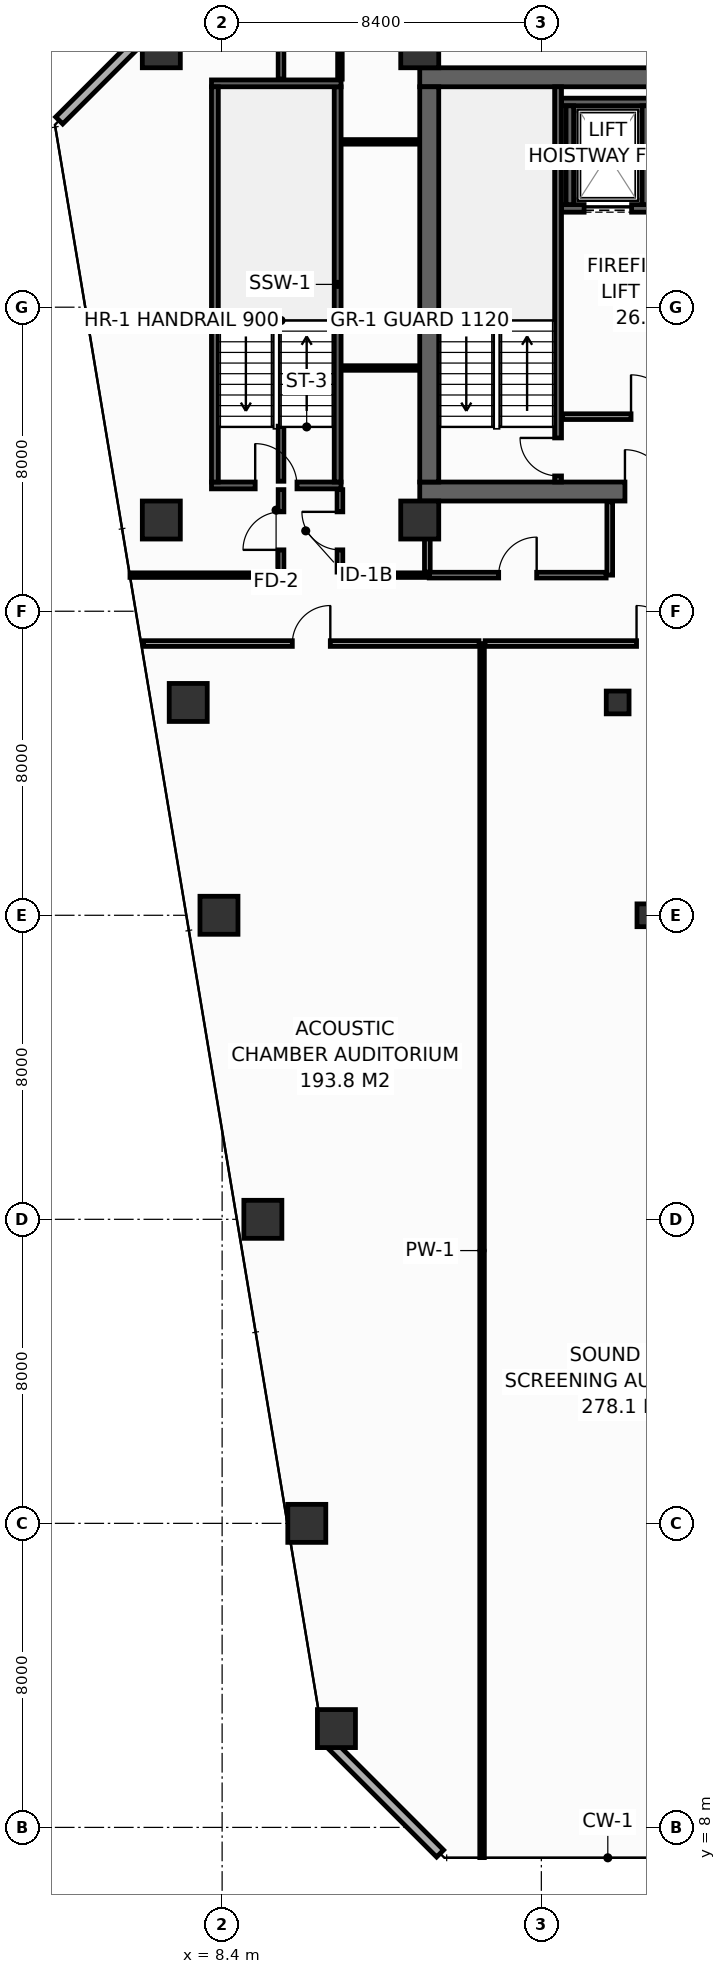
"""IFC4 building model, lengths in metres.
Left out: names, types, materials, properties, quantities, classifications, styles, units other than length and angle.
Written with IfcOpenShell. Run it as: python <this file> out.ifc"""

import sys

from ifc_helpers import new_model, si_unit, direction, frame, frame_2d, origin, origin_2d, place, context, subcontext, project, spatial, rectangle, hollow_rectangle, extrude, element, fill, save


model = new_model("IFC4")
c1 = context("Model", 3, precision=1e-05, world=origin(), true_north=direction((0.0, 1.0)))
c2 = subcontext(c1, "Body", "Model", "MODEL_VIEW")
j1 = project(units=[si_unit("LENGTHUNIT", "METRE"), si_unit("PLANEANGLEUNIT", "RADIAN")], contexts=[c1])
p1 = place(None, origin())
s1 = spatial("IfcSite", under=j1, at=p1, CompositionType="ELEMENT")
p2 = place(p1, origin())
s2 = spatial("IfcBuilding", under=s1, at=p2, CompositionType="ELEMENT")
p3 = place(p2, frame((0.0, 0.0, 144.8)))
s3 = spatial("IfcBuildingStorey", under=s2, at=p3, CompositionType="ELEMENT", Elevation=144.8)
p4 = place(p3, frame((13.6, 43.15, 0.0), z_axis=(0.0, 0.0, 1.0), x_axis=(1.0, 0.0, 0.0)))
e1 = element("IfcWall", 1, at=p4, inside=s3, PredefinedType="SHEAR", context=c2, shape_type="SweptSolid", body=[
    extrude(rectangle(XDim=32.7, YDim=0.5, at=frame_2d((16.35, 0.0))), origin(), (0.0, 0.0, 1.0), 3.55),
])
p5 = place(p4, frame((5.4, 0.0, 0.0)))
e2 = element("IfcOpeningElement", 2, at=p5, cuts=e1, PredefinedType="OPENING", context=c2, shape_type="SweptSolid", body=[
    extrude(rectangle(XDim=1.1, YDim=2.15, at=frame_2d((0.55, 1.075))), frame((0.0, 0.26, 0.0), z_axis=(0.0, -1.0, 0.0), x_axis=(1.0, 0.0, 0.0)), (0.0, 0.0, 1.0), 0.52),
])
p6 = place(p4, frame((25.6, 0.0, 0.0)))
e3 = element("IfcOpeningElement", 3, at=p6, cuts=e1, PredefinedType="OPENING", context=c2, shape_type="SweptSolid", body=[
    extrude(rectangle(XDim=1.1, YDim=2.15, at=frame_2d((0.55, 1.075))), frame((0.0, 0.26, 0.0), z_axis=(0.0, -1.0, 0.0), x_axis=(1.0, 0.0, 0.0)), (0.0, 0.0, 1.0), 0.52),
])
p7 = place(p3, frame((13.6, 54.05, 0.0), z_axis=(0.0, 0.0, 1.0), x_axis=(1.0, 0.0, 0.0)))
e4 = element("IfcWall", 4, at=p7, inside=s3, PredefinedType="SHEAR", context=c2, shape_type="SweptSolid", body=[
    extrude(rectangle(XDim=32.7, YDim=0.5, at=frame_2d((16.35, 0.0))), origin(), (0.0, 0.0, 1.0), 3.55),
])
p8 = place(p3, frame((13.85, 43.4, 0.0), z_axis=(0.0, 0.0, 1.0), x_axis=(0.0, 1.0, 0.0)))
e5 = element("IfcWall", 5, at=p8, inside=s3, PredefinedType="SHEAR", context=c2, shape_type="SweptSolid", body=[
    extrude(rectangle(XDim=10.4, YDim=0.5, at=frame_2d((5.2, 0.0))), origin(), (0.0, 0.0, 1.0), 3.55),
])
for number, where, z_axis, x_axis in (
    (6, (6.8, 54.8, 0.0), (0.0, 0.0, 1.0), (1.0, 0.0, 0.0)),
    (7, (13.6, 54.8, 0.0), (0.0, 0.0, 1.0), (1.0, 0.0, 0.0)),
    (8, (6.8, 42.4, 0.0), (0.0, 0.0, 1.0), (1.0, 0.0, 0.0)),
    (9, (13.6, 42.4, 0.0), (0.0, 0.0, 1.0), (1.0, 0.0, 0.0)),
    (10, (11.408, 10.6, 0.0), (0.0, 0.0, 1.0), (1.0, 0.0, 0.0)),
    (11, (10.628, 16.0, 0.0), (0.0, 0.0, 1.0), (1.0, 0.0, 0.0)),
    (12, (9.472, 24.0, 0.0), (0.0, 0.0, 1.0), (1.0, 0.0, 0.0)),
    (13, (8.317, 32.0, 0.0), (0.0, 0.0, 1.0), (1.0, 0.0, 0.0)),
):
    element("IfcColumn", number, at=place(p3, frame(where, z_axis=z_axis, x_axis=x_axis)), inside=s3, PredefinedType="COLUMN", context=c2, shape_type="SweptSolid", body=[
        extrude(hollow_rectangle(XDim=1.0, YDim=1.0, WallThickness=0.045, at=origin_2d()), origin(), (0.0, 0.0, 1.0), 3.8),
    ])
p9 = place(p3, frame((19.617, 32.0, 0.0), z_axis=(0.0, 0.0, 1.0), x_axis=(1.0, 0.0, 0.0)))
e14 = element("IfcColumn", 14, at=p9, inside=s3, PredefinedType="COLUMN", context=c2, shape_type="SweptSolid", body=[
    extrude(hollow_rectangle(XDim=0.6, YDim=0.6, WallThickness=0.028, at=origin_2d()), origin(), (0.0, 0.0, 1.0), 3.8),
])
p10 = place(p3, frame((7.508, 37.6, 0.0), z_axis=(0.0, 0.0, 1.0), x_axis=(1.0, 0.0, 0.0)))
e15 = element("IfcColumn", 15, at=p10, inside=s3, PredefinedType="COLUMN", context=c2, shape_type="SweptSolid", body=[
    extrude(hollow_rectangle(XDim=1.0, YDim=1.0, WallThickness=0.045, at=origin_2d()), origin(), (0.0, 0.0, 1.0), 3.8),
])
p11 = place(p3, frame((18.808, 37.6, 0.0), z_axis=(0.0, 0.0, 1.0), x_axis=(1.0, 0.0, 0.0)))
e16 = element("IfcColumn", 16, at=p11, inside=s3, PredefinedType="COLUMN", context=c2, shape_type="SweptSolid", body=[
    extrude(hollow_rectangle(XDim=0.6, YDim=0.6, WallThickness=0.028, at=origin_2d()), origin(), (0.0, 0.0, 1.0), 3.8),
])
p12 = place(p3, frame((17.33, 50.6, 0.0), z_axis=(0.0, 0.0, 1.0), x_axis=(1.0, 0.0, 0.0)))
e17 = element("IfcWall", 17, at=p12, inside=s3, PredefinedType="SHEAR", context=c2, shape_type="SweptSolid", body=[
    extrude(rectangle(XDim=2.52, YDim=0.2, at=frame_2d((1.26, 0.0))), origin(), (0.0, 0.0, 1.0), 3.55),
])
p13 = place(p12, frame((0.595, 0.0, 0.0)))
e18 = element("IfcOpeningElement", 18, at=p13, cuts=e17, PredefinedType="OPENING", context=c2, shape_type="SweptSolid", body=[
    extrude(rectangle(XDim=1.25, YDim=2.3, at=frame_2d((0.625, 1.15))), frame((0.0, 0.11, 0.0), z_axis=(0.0, -1.0, 0.0), x_axis=(1.0, 0.0, 0.0)), (0.0, 0.0, 1.0), 0.22),
])
p14 = place(p3, frame((17.33, 53.4, 0.0), z_axis=(0.0, 0.0, 1.0), x_axis=(1.0, 0.0, 0.0)))
e19 = element("IfcWall", 19, at=p14, inside=s3, PredefinedType="SHEAR", context=c2, shape_type="SweptSolid", body=[
    extrude(rectangle(XDim=2.52, YDim=0.2, at=frame_2d((1.26, 0.0))), origin(), (0.0, 0.0, 1.0), 3.55),
])
for number, where, z_axis, x_axis in (
    (20, (17.55, 50.7, 0.0), (0.0, 0.0, 1.0), (0.0, 1.0, 0.0)),
    (21, (19.55, 50.7, 0.0), (0.0, 0.0, 1.0), (0.0, 1.0, 0.0)),
):
    element("IfcWall", number, at=place(p3, frame(where, z_axis=z_axis, x_axis=x_axis)), inside=s3, PredefinedType="SHEAR", context=c2, shape_type="SweptSolid", body=[
        extrude(rectangle(XDim=2.6, YDim=0.2, at=frame_2d((1.3, 0.0))), origin(), (0.0, 0.0, 1.0), 3.55),
    ])
p15 = place(p3, frame((17.24, 43.4, 0.0), z_axis=(0.0, 0.0, 1.0), x_axis=(0.0, 1.0, 0.0)))
e22 = element("IfcWall", 22, at=p15, inside=s3, PredefinedType="SHEAR", context=c2, shape_type="SweptSolid", body=[
    extrude(rectangle(XDim=10.4, YDim=0.18, at=frame_2d((5.2, 0.0))), origin(), (0.0, 0.0, 1.0), 3.55),
])
p16 = place(p15, frame((0.16, 0.0, 0.0)))
e23 = element("IfcOpeningElement", 23, at=p16, cuts=e22, PredefinedType="OPENING", context=c2, shape_type="SweptSolid", body=[
    extrude(rectangle(XDim=1.0, YDim=2.15, at=frame_2d((0.5, 1.075))), frame((0.0, 0.1, 0.0), z_axis=(0.0, -1.0, 0.0), x_axis=(1.0, 0.0, 0.0)), (0.0, 0.0, 1.0), 0.2),
])
p17 = place(p3, frame((8.12, 43.31, 0.0), z_axis=(0.0, 0.0, 1.0), x_axis=(1.0, 0.0, 0.0)))
e24 = element("IfcWall", 24, at=p17, inside=s3, PredefinedType="SHEAR", context=c2, shape_type="SweptSolid", body=[
    extrude(rectangle(XDim=3.41, YDim=0.18, at=frame_2d((1.705, 0.0))), origin(), (0.0, 0.0, 1.0), 3.55),
])
p18 = place(p17, frame((1.15, 0.0, 0.0)))
e25 = element("IfcOpeningElement", 25, at=p18, cuts=e24, PredefinedType="OPENING", context=c2, shape_type="SweptSolid", body=[
    extrude(rectangle(XDim=1.1, YDim=2.15, at=frame_2d((0.55, 1.075))), frame((0.0, 0.1, 0.0), z_axis=(0.0, -1.0, 0.0), x_axis=(1.0, 0.0, 0.0)), (0.0, 0.0, 1.0), 0.2),
])
p19 = place(p3, frame((11.44, 43.4, 0.0), z_axis=(0.0, 0.0, 1.0), x_axis=(0.0, 1.0, 0.0)))
e26 = element("IfcWall", 26, at=p19, inside=s3, PredefinedType="SHEAR", context=c2, shape_type="SweptSolid", body=[
    extrude(rectangle(XDim=10.4, YDim=0.18, at=frame_2d((5.2, 0.0))), origin(), (0.0, 0.0, 1.0), 3.55),
])
p20 = place(p3, frame((11.53, 53.89, 0.0), z_axis=(0.0, 0.0, 1.0), x_axis=(-1.0, 0.0, 0.0)))
e27 = element("IfcWall", 27, at=p20, inside=s3, PredefinedType="SHEAR", context=c2, shape_type="SweptSolid", body=[
    extrude(rectangle(XDim=3.41, YDim=0.18, at=frame_2d((1.705, 0.0))), origin(), (0.0, 0.0, 1.0), 3.55),
])
p21 = place(p3, frame((8.21, 53.8, 0.0), z_axis=(0.0, 0.0, 1.0), x_axis=(0.0, -1.0, 0.0)))
e28 = element("IfcWall", 28, at=p21, inside=s3, PredefinedType="SHEAR", context=c2, shape_type="SweptSolid", body=[
    extrude(rectangle(XDim=10.4, YDim=0.18, at=frame_2d((5.2, 0.0))), origin(), (0.0, 0.0, 1.0), 3.55),
])
p22 = place(p3, frame((17.36, 45.12, 0.0), z_axis=(0.0, 0.0, 1.0), x_axis=(1.0, 0.0, 0.0)))
e29 = element("IfcWall", 29, at=p22, inside=s3, PredefinedType="PARTITIONING", context=c2, shape_type="SweptSolid", body=[
    extrude(rectangle(XDim=5.14, YDim=0.15, at=frame_2d((2.57, 0.0))), origin(), (0.0, 0.0, 1.0), 3.55),
])
p23 = place(p22, frame((1.8, 0.0, 0.0)))
e30 = element("IfcOpeningElement", 30, at=p23, cuts=e29, PredefinedType="OPENING", context=c2, shape_type="SweptSolid", body=[
    extrude(rectangle(XDim=1.1, YDim=2.15, at=frame_2d((0.55, 1.075))), frame((0.0, 0.085, 0.0), z_axis=(0.0, -1.0, 0.0), x_axis=(1.0, 0.0, 0.0)), (0.0, 0.0, 1.0), 0.17),
])
p24 = place(p3, frame((11.162, 10.287, 0.0), z_axis=(0.0, 0.0, 1.0), x_axis=(0.70707775441, -0.707135806771, 0.0)))
e31 = element("IfcWall", 31, at=p24, inside=s3, PredefinedType="STANDARD", context=c2, shape_type="SweptSolid", body=[
    extrude(rectangle(XDim=4.206, YDim=0.26, at=frame_2d((2.103, 0.0))), origin(), (0.0, 0.0, 1.0), 3.55),
])
p25 = place(p3, frame((7.087, 55.887, 0.0), z_axis=(0.0, 0.0, 1.0), x_axis=(-0.707106781187, -0.707106781187, 0.0)))
e32 = element("IfcWall", 32, at=p25, inside=s3, PredefinedType="STANDARD", context=c2, shape_type="SweptSolid", body=[
    extrude(rectangle(XDim=4.206, YDim=0.26, at=frame_2d((2.103, 0.0))), origin(), (0.0, 0.0, 1.0), 3.55),
])
p26 = place(p3, frame((5.975, 40.95, 0.0), z_axis=(0.0, 0.0, 1.0), x_axis=(1.0, 0.0, 0.0)))
e33 = element("IfcWall", 33, at=p26, inside=s3, PredefinedType="PARTITIONING", context=c2, shape_type="SweptSolid", body=[
    extrude(rectangle(XDim=3.975, YDim=0.12, at=frame_2d((1.987, 0.0))), origin(), (0.0, 0.0, 1.0), 3.035),
])
p27 = place(p3, frame((11.5, 40.95, 0.0), z_axis=(0.0, 0.0, 1.0), x_axis=(1.0, 0.0, 0.0)))
e34 = element("IfcWall", 34, at=p27, inside=s3, PredefinedType="PARTITIONING", context=c2, shape_type="SweptSolid", body=[
    extrude(rectangle(XDim=2.35, YDim=0.12, at=frame_2d((1.175, 0.0))), origin(), (0.0, 0.0, 1.0), 3.55),
])
p28 = place(p3, frame((11.55, 52.35, 0.0), z_axis=(0.0, 0.0, 1.0), x_axis=(1.0, 0.0, 0.0)))
e35 = element("IfcWall", 35, at=p28, inside=s3, PredefinedType="PARTITIONING", context=c2, shape_type="SweptSolid", body=[
    extrude(rectangle(XDim=2.03, YDim=0.12, at=frame_2d((1.015, 0.0))), origin(), (0.0, 0.0, 1.0), 3.55),
])
p29 = place(p3, frame((11.5, 54.0, 0.0), z_axis=(0.0, 0.0, 1.0), x_axis=(0.0, 1.0, 0.0)))
e36 = element("IfcWall", 36, at=p29, inside=s3, PredefinedType="PARTITIONING", context=c2, shape_type="SweptSolid", body=[
    extrude(rectangle(XDim=1.995, YDim=0.12, at=frame_2d((0.998, 0.0))), origin(), (0.0, 0.0, 1.0), 2.935),
])
p30 = place(p3, frame((4.87, 47.6, 0.0), z_axis=(0.0, 0.0, 1.0), x_axis=(1.0, 0.0, 0.0)))
e37 = element("IfcWall", 37, at=p30, inside=s3, PredefinedType="PARTITIONING", context=c2, shape_type="SweptSolid", body=[
    extrude(rectangle(XDim=3.23, YDim=0.12, at=frame_2d((1.615, 0.0))), origin(), (0.0, 0.0, 1.0), 2.835),
])
p31 = place(p3, frame((9.95, 41.03, 0.0), z_axis=(0.0, 0.0, 1.0), x_axis=(0.0, 1.0, 0.0)))
e38 = element("IfcWall", 38, at=p31, inside=s3, PredefinedType="PARTITIONING", context=c2, shape_type="SweptSolid", body=[
    extrude(rectangle(XDim=2.17, YDim=0.15, at=frame_2d((1.085, 0.0))), origin(), (0.0, 0.0, 1.0), 2.835),
])
p32 = place(p31, frame((0.585, 0.0, 0.0)))
e39 = element("IfcOpeningElement", 39, at=p32, cuts=e38, PredefinedType="OPENING", context=c2, shape_type="SweptSolid", body=[
    extrude(rectangle(XDim=1.0, YDim=2.15, at=frame_2d((0.5, 1.075))), frame((0.0, 0.085, 0.0), z_axis=(0.0, -1.0, 0.0), x_axis=(1.0, 0.0, 0.0)), (0.0, 0.0, 1.0), 0.17),
])
p33 = place(p3, frame((9.95, 43.42, 0.0), z_axis=(0.0, 0.0, 1.0), x_axis=(0.0, 1.0, 0.0)))
e40 = element("IfcWall", 40, at=p33, inside=s3, PredefinedType="PARTITIONING", context=c2, shape_type="SweptSolid", body=[
    extrude(rectangle(XDim=1.45, YDim=0.15, at=frame_2d((0.725, 0.0))), origin(), (0.0, 0.0, 1.0), 3.55),
])
p34 = place(p3, frame((9.95, 54.0, 0.0), z_axis=(0.0, 0.0, 1.0), x_axis=(0.0, 1.0, 0.0)))
e41 = element("IfcWall", 41, at=p34, inside=s3, PredefinedType="PARTITIONING", context=c2, shape_type="SweptSolid", body=[
    extrude(rectangle(XDim=1.995, YDim=0.15, at=frame_2d((0.998, 0.0))), origin(), (0.0, 0.0, 1.0), 2.935),
])
p35 = place(p3, frame((11.55, 46.4, 0.0), z_axis=(0.0, 0.0, 1.0), x_axis=(1.0, 0.0, 0.0)))
e42 = element("IfcWall", 42, at=p35, inside=s3, PredefinedType="PARTITIONING", context=c2, shape_type="SweptSolid", body=[
    extrude(rectangle(XDim=2.03, YDim=0.12, at=frame_2d((1.015, 0.0))), origin(), (0.0, 0.0, 1.0), 3.55),
])
p36 = place(p3, frame((11.5, 41.03, 0.0), z_axis=(0.0, 0.0, 1.0), x_axis=(0.0, 1.0, 0.0)))
e43 = element("IfcWall", 43, at=p36, inside=s3, PredefinedType="PARTITIONING", context=c2, shape_type="SweptSolid", body=[
    extrude(rectangle(XDim=2.17, YDim=0.15, at=frame_2d((1.085, 0.0))), origin(), (0.0, 0.0, 1.0), 2.835),
])
p37 = place(p36, frame((0.585, 0.0, 0.0)))
e44 = element("IfcOpeningElement", 44, at=p37, cuts=e43, PredefinedType="OPENING", context=c2, shape_type="SweptSolid", body=[
    extrude(rectangle(XDim=1.0, YDim=2.15, at=frame_2d((0.5, 1.075))), frame((0.0, 0.085, 0.0), z_axis=(0.0, -1.0, 0.0), x_axis=(1.0, 0.0, 0.0)), (0.0, 0.0, 1.0), 0.17),
])
p38 = place(p3, frame((13.8, 41.03, 0.0), z_axis=(0.0, 0.0, 1.0), x_axis=(0.0, 1.0, 0.0)))
e45 = element("IfcWall", 45, at=p38, inside=s3, PredefinedType="PARTITIONING", context=c2, shape_type="SweptSolid", body=[
    extrude(rectangle(XDim=1.85, YDim=0.15, at=frame_2d((0.925, 0.0))), origin(), (0.0, 0.0, 1.0), 3.55),
])
p39 = place(p3, frame((18.6, 40.95, 0.0), z_axis=(0.0, 0.0, 1.0), x_axis=(0.0, 1.0, 0.0)))
e46 = element("IfcWall", 46, at=p39, inside=s3, PredefinedType="PARTITIONING", context=c2, shape_type="SweptSolid", body=[
    extrude(rectangle(XDim=1.93, YDim=0.15, at=frame_2d((0.965, 0.0))), origin(), (0.0, 0.0, 1.0), 3.55),
])
p40 = place(p3, frame((13.85, 40.95, 0.0), z_axis=(0.0, 0.0, 1.0), x_axis=(1.0, 0.0, 0.0)))
e47 = element("IfcWall", 47, at=p40, inside=s3, PredefinedType="PARTITIONING", context=c2, shape_type="SweptSolid", body=[
    extrude(rectangle(XDim=4.655, YDim=0.15, at=frame_2d((2.327, 0.0))), origin(), (0.0, 0.0, 1.0), 3.55),
])
p41 = place(p40, frame((1.827, 0.0, 0.0)))
e48 = element("IfcOpeningElement", 48, at=p41, cuts=e47, PredefinedType="OPENING", context=c2, shape_type="SweptSolid", body=[
    extrude(rectangle(XDim=1.0, YDim=2.15, at=frame_2d((0.5, 1.075))), frame((0.0, 0.085, 0.0), z_axis=(0.0, -1.0, 0.0), x_axis=(1.0, 0.0, 0.0)), (0.0, 0.0, 1.0), 0.17),
])
p42 = place(p3, frame((15.24, 7.205, 0.0), z_axis=(0.0, 0.0, 1.0), x_axis=(0.0, 1.0, 0.0)))
e49 = element("IfcWall", 49, at=p42, inside=s3, PredefinedType="PARTITIONING", context=c2, shape_type="SweptSolid", body=[
    extrude(rectangle(XDim=31.945, YDim=0.12, at=frame_2d((15.972, 0.0))), origin(), (0.0, 0.0, 1.0), 2.835),
])
p43 = place(p3, frame((6.334, 39.15, 0.0), z_axis=(0.0, 0.0, 1.0), x_axis=(1.0, 0.0, 0.0)))
e50 = element("IfcWall", 50, at=p43, inside=s3, PredefinedType="PARTITIONING", context=c2, shape_type="SweptSolid", body=[
    extrude(rectangle(XDim=8.826, YDim=0.15, at=frame_2d((4.413, 0.0))), origin(), (0.0, 0.0, 1.0), 3.035),
])
p44 = place(p43, frame((3.913, 0.0, 0.0)))
e51 = element("IfcOpeningElement", 51, at=p44, cuts=e50, PredefinedType="OPENING", context=c2, shape_type="SweptSolid", body=[
    extrude(rectangle(XDim=1.0, YDim=2.15, at=frame_2d((0.5, 1.075))), frame((0.0, 0.085, 0.0), z_axis=(0.0, -1.0, 0.0), x_axis=(1.0, 0.0, 0.0)), (0.0, 0.0, 1.0), 0.17),
])
p45 = place(p3, frame((15.32, 39.15, 0.0), z_axis=(0.0, 0.0, 1.0), x_axis=(1.0, 0.0, 0.0)))
e52 = element("IfcWall", 52, at=p45, inside=s3, PredefinedType="PARTITIONING", context=c2, shape_type="SweptSolid", body=[
    extrude(rectangle(XDim=8.53, YDim=0.15, at=frame_2d((4.265, 0.0))), origin(), (0.0, 0.0, 1.0), 2.835),
])
p46 = place(p45, frame((3.985, 0.0, 0.0)))
e53 = element("IfcOpeningElement", 53, at=p46, cuts=e52, PredefinedType="OPENING", context=c2, shape_type="SweptSolid", body=[
    extrude(rectangle(XDim=1.0, YDim=2.15, at=frame_2d((0.5, 1.075))), frame((0.0, 0.085, 0.0), z_axis=(0.0, -1.0, 0.0), x_axis=(1.0, 0.0, 0.0)), (0.0, 0.0, 1.0), 0.17),
])
p47 = place(p13, origin())
e54 = element("IfcDoor", 54, at=p47, inside=s3, OperationType="SLIDING_TO_LEFT", PredefinedType="DOOR", context=c2, shape_type="SweptSolid", body=[
    extrude(rectangle(XDim=1.25, YDim=2.3, at=frame_2d((0.625, 1.15))), frame((0.0, 0.025, 0.0), z_axis=(0.0, -1.0, 0.0), x_axis=(1.0, 0.0, 0.0)), (0.0, 0.0, 1.0), 0.05),
])
fill(e18, e54)
p48 = place(p16, origin())
e55 = element("IfcDoor", 55, at=p48, inside=s3, OperationType="SINGLE_SWING_RIGHT", PredefinedType="DOOR", context=c2, shape_type="SweptSolid", body=[
    extrude(rectangle(XDim=1.0, YDim=2.15, at=frame_2d((0.5, 1.075))), frame((0.0, 0.025, 0.0), z_axis=(0.0, -1.0, 0.0), x_axis=(1.0, 0.0, 0.0)), (0.0, 0.0, 1.0), 0.05),
])
fill(e23, e55)
p49 = place(p18, origin())
e56 = element("IfcDoor", 56, at=p49, inside=s3, OperationType="SINGLE_SWING_LEFT", PredefinedType="DOOR", context=c2, shape_type="SweptSolid", body=[
    extrude(rectangle(XDim=1.1, YDim=2.15, at=frame_2d((0.55, 1.075))), frame((0.0, 0.025, 0.0), z_axis=(0.0, -1.0, 0.0), x_axis=(1.0, 0.0, 0.0)), (0.0, 0.0, 1.0), 0.05),
])
fill(e25, e56)
p50 = place(p23, origin())
e57 = element("IfcDoor", 57, at=p50, inside=s3, OperationType="SINGLE_SWING_LEFT", PredefinedType="DOOR", context=c2, shape_type="SweptSolid", body=[
    extrude(rectangle(XDim=1.1, YDim=2.15, at=frame_2d((0.55, 1.075))), frame((0.0, 0.025, 0.0), z_axis=(0.0, -1.0, 0.0), x_axis=(1.0, 0.0, 0.0)), (0.0, 0.0, 1.0), 0.05),
])
fill(e30, e57)
p51 = place(p5, origin())
e58 = element("IfcDoor", 58, at=p51, inside=s3, OperationType="SINGLE_SWING_LEFT", PredefinedType="DOOR", context=c2, shape_type="SweptSolid", body=[
    extrude(rectangle(XDim=1.1, YDim=2.15, at=frame_2d((0.55, 1.075))), frame((0.0, 0.025, 0.0), z_axis=(0.0, -1.0, 0.0), x_axis=(1.0, 0.0, 0.0)), (0.0, 0.0, 1.0), 0.05),
])
fill(e2, e58)
p52 = place(p32, origin())
e59 = element("IfcDoor", 59, at=p52, inside=s3, OperationType="SINGLE_SWING_LEFT", PredefinedType="DOOR", context=c2, shape_type="SweptSolid", body=[
    extrude(rectangle(XDim=1.0, YDim=2.15, at=frame_2d((0.5, 1.075))), frame((0.0, 0.025, 0.0), z_axis=(0.0, -1.0, 0.0), x_axis=(1.0, 0.0, 0.0)), (0.0, 0.0, 1.0), 0.05),
])
fill(e39, e59)
p53 = place(p37, origin())
e60 = element("IfcDoor", 60, at=p53, inside=s3, OperationType="SINGLE_SWING_RIGHT", PredefinedType="DOOR", context=c2, shape_type="SweptSolid", body=[
    extrude(rectangle(XDim=1.0, YDim=2.15, at=frame_2d((0.5, 1.075))), frame((0.0, 0.025, 0.0), z_axis=(0.0, -1.0, 0.0), x_axis=(1.0, 0.0, 0.0)), (0.0, 0.0, 1.0), 0.05),
])
fill(e44, e60)
p54 = place(p41, origin())
e61 = element("IfcDoor", 61, at=p54, inside=s3, OperationType="SINGLE_SWING_RIGHT", PredefinedType="DOOR", context=c2, shape_type="SweptSolid", body=[
    extrude(rectangle(XDim=1.0, YDim=2.15, at=frame_2d((0.5, 1.075))), frame((0.0, 0.025, 0.0), z_axis=(0.0, -1.0, 0.0), x_axis=(1.0, 0.0, 0.0)), (0.0, 0.0, 1.0), 0.05),
])
fill(e48, e61)
p55 = place(p44, origin())
e62 = element("IfcDoor", 62, at=p55, inside=s3, OperationType="SINGLE_SWING_RIGHT", PredefinedType="DOOR", context=c2, shape_type="SweptSolid", body=[
    extrude(rectangle(XDim=1.0, YDim=2.15, at=frame_2d((0.5, 1.075))), frame((0.0, 0.025, 0.0), z_axis=(0.0, -1.0, 0.0), x_axis=(1.0, 0.0, 0.0)), (0.0, 0.0, 1.0), 0.05),
])
fill(e51, e62)
p56 = place(p46, origin())
e63 = element("IfcDoor", 63, at=p56, inside=s3, OperationType="SINGLE_SWING_LEFT", PredefinedType="DOOR", context=c2, shape_type="SweptSolid", body=[
    extrude(rectangle(XDim=1.0, YDim=2.15, at=frame_2d((0.5, 1.075))), frame((0.0, 0.025, 0.0), z_axis=(0.0, -1.0, 0.0), x_axis=(1.0, 0.0, 0.0)), (0.0, 0.0, 1.0), 0.05),
])
fill(e53, e63)
save(model, sys.argv[1])
